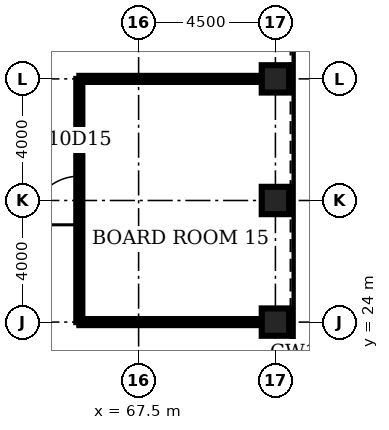
"""IFC4 building model, lengths in metres.
Left out: names, types, materials, properties, quantities, classifications, styles, units other than length and angle.
Written with IfcOpenShell. Run it as: python <this file> out.ifc"""

import sys

from ifc_helpers import new_model, si_unit, direction, frame, frame_2d, origin, origin_2d, place, context, subcontext, project, spatial, rectangle, hollow_rectangle, extrude, element, fill, save


model = new_model("IFC4")
c1 = context("Model", 3, precision=1e-05, world=origin(), true_north=direction((0.0, 1.0)))
c2 = subcontext(c1, "Body", "Model", "MODEL_VIEW")
j1 = project(units=[si_unit("LENGTHUNIT", "METRE"), si_unit("PLANEANGLEUNIT", "RADIAN")], contexts=[c1])
p1 = place(None, origin())
s1 = spatial("IfcSite", under=j1, at=p1, CompositionType="ELEMENT")
p2 = place(p1, origin())
s2 = spatial("IfcBuilding", under=s1, at=p2, CompositionType="ELEMENT")
p3 = place(p2, frame((0.0, 0.0, 50.0)))
s3 = spatial("IfcBuildingStorey", under=s2, at=p3, CompositionType="ELEMENT", Elevation=50.0)
for number, where, z_axis, x_axis in (
    (1, (72.0, 24.0, 0.0), (0.0, 0.0, 1.0), (1.0, 0.0, 0.0)),
    (2, (72.0, 28.0, 0.0), (0.0, 0.0, 1.0), (1.0, 0.0, 0.0)),
    (3, (72.0, 32.0, 0.0), (0.0, 0.0, 1.0), (1.0, 0.0, 0.0)),
):
    element("IfcColumn", number, at=place(p3, frame(where, z_axis=z_axis, x_axis=x_axis)), inside=s3, PredefinedType="COLUMN", context=c2, shape_type="SweptSolid", body=[
        extrude(hollow_rectangle(XDim=0.9, YDim=0.9, WallThickness=0.12, at=origin_2d()), origin(), (0.0, 0.0, 1.0), 4.5),
    ])
for number, where, z_axis, x_axis in (
    (4, (65.55, 24.0, 0.0), (0.0, 0.0, 1.0), (1.0, 0.0, 0.0)),
    (5, (65.55, 32.0, 0.0), (0.0, 0.0, 1.0), (1.0, 0.0, 0.0)),
):
    element("IfcWall", number, at=place(p3, frame(where, z_axis=z_axis, x_axis=x_axis)), inside=s3, PredefinedType="PARTITIONING", context=c2, shape_type="SweptSolid", body=[
        extrude(rectangle(XDim=6.0, YDim=0.2, at=frame_2d((3.0, 0.0))), origin(), (0.0, 0.0, 1.0), 3.0),
    ])
p4 = place(p3, frame((65.55, 24.0, 0.0), z_axis=(0.0, 0.0, 1.0), x_axis=(0.0, 1.0, 0.0)))
e6 = element("IfcWall", 6, at=p4, inside=s3, PredefinedType="PARTITIONING", context=c2, shape_type="SweptSolid", body=[
    extrude(rectangle(XDim=8.0, YDim=0.2, at=frame_2d((4.0, 0.0))), origin(), (0.0, 0.0, 1.0), 3.0),
])
p5 = place(p4, frame((3.2, 0.0, 0.0)))
e7 = element("IfcOpeningElement", 7, at=p5, cuts=e6, PredefinedType="OPENING", context=c2, shape_type="SweptSolid", body=[
    extrude(rectangle(XDim=1.6, YDim=2.1, at=frame_2d((0.8, 1.05))), frame((0.0, 0.11, 0.0), z_axis=(0.0, -1.0, 0.0), x_axis=(1.0, 0.0, 0.0)), (0.0, 0.0, 1.0), 0.22),
])
p6 = place(p5, origin())
e8 = element("IfcDoor", 8, at=p6, inside=s3, OperationType="SINGLE_SWING_LEFT", PredefinedType="DOOR", context=c2, shape_type="SweptSolid", body=[
    extrude(rectangle(XDim=1.6, YDim=2.1, at=frame_2d((0.8, 1.05))), frame((0.0, 0.025, 0.0), z_axis=(0.0, -1.0, 0.0), x_axis=(1.0, 0.0, 0.0)), (0.0, 0.0, 1.0), 0.05),
])
fill(e7, e8)
save(model, sys.argv[1])
